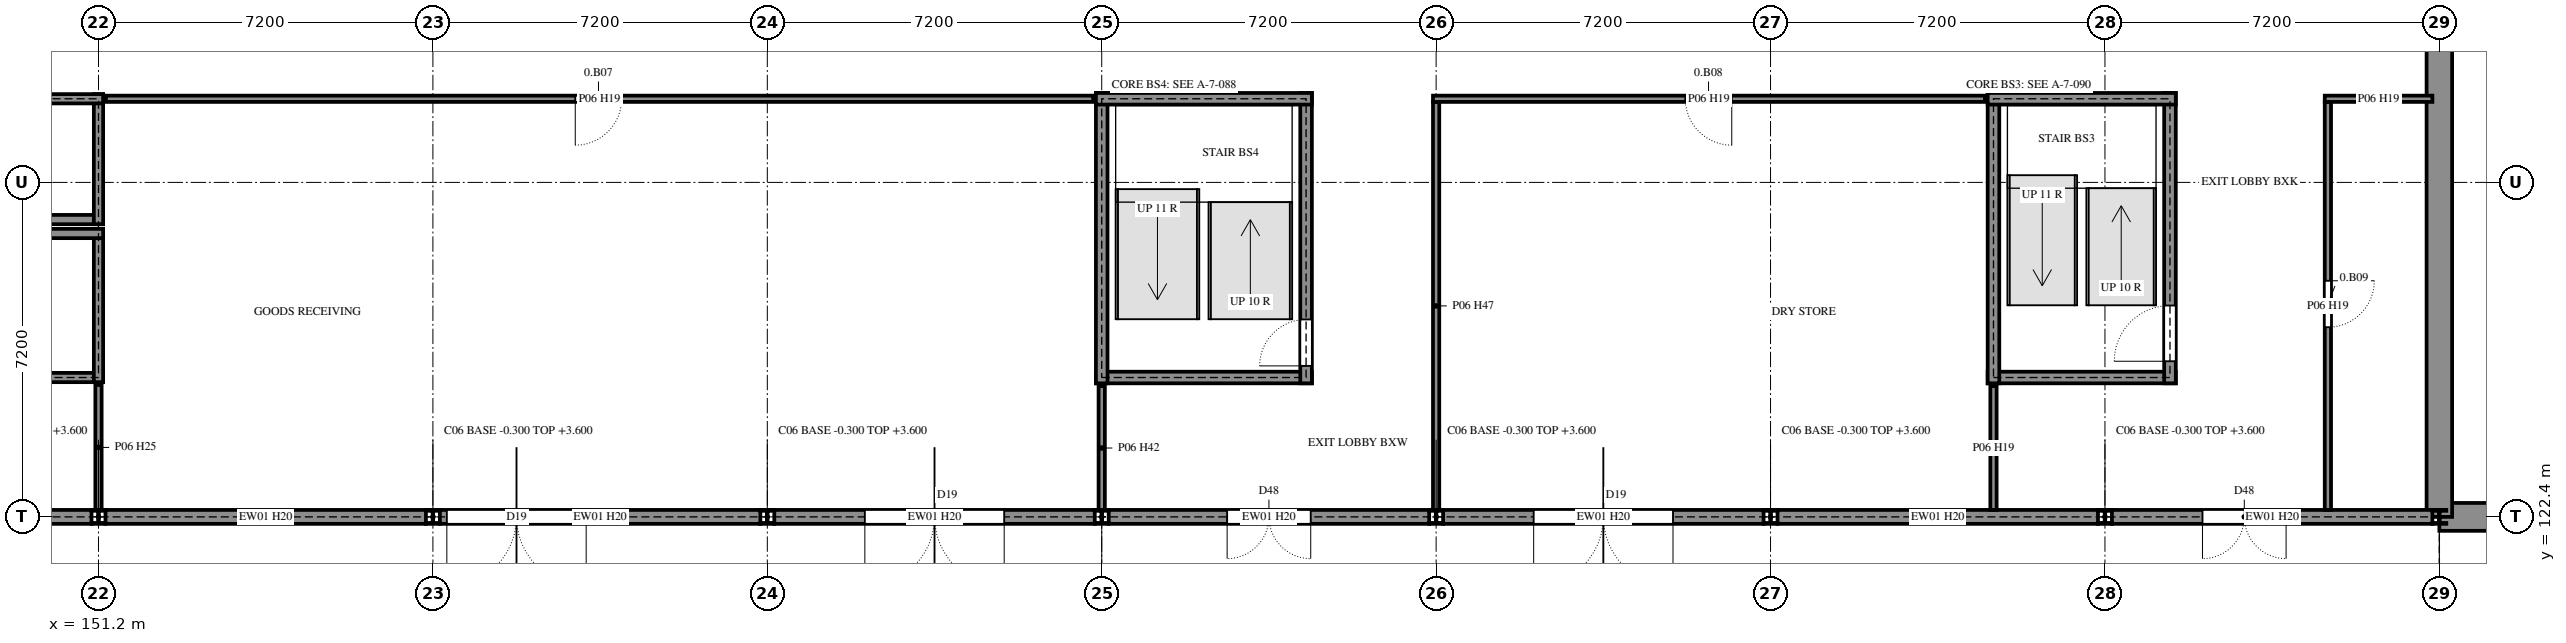
"""IFC4 building model, lengths in metres.
Left out: names, types, materials, properties, quantities, classifications, styles, units other than length and angle.
Written with IfcOpenShell. Run it as: python <this file> out.ifc"""

import sys

from ifc_helpers import new_model, si_unit, direction, frame, frame_2d, origin, origin_2d, place, context, subcontext, project, spatial, rectangle, i_section, extrude, element, fill, save


model = new_model("IFC4")
c1 = context("Model", 3, precision=1e-05, world=origin(), true_north=direction((0.0, 1.0)))
c2 = subcontext(c1, "Body", "Model", "MODEL_VIEW")
j1 = project(units=[si_unit("LENGTHUNIT", "METRE"), si_unit("PLANEANGLEUNIT", "RADIAN")], contexts=[c1])
p1 = place(None, origin())
s1 = spatial("IfcSite", under=j1, at=p1, CompositionType="ELEMENT")
p2 = place(p1, origin())
s2 = spatial("IfcBuilding", under=s1, at=p2, CompositionType="ELEMENT")
p3 = place(p2, origin())
s3 = spatial("IfcBuildingStorey", under=s2, at=p3, CompositionType="ELEMENT", Elevation=0.0)
for number, where, z_axis, x_axis in (
    (1, (151.2, 122.4, -0.3), (0.0, 0.0, 1.0), (1.0, 0.0, 0.0)),
    (2, (158.4, 122.4, -0.3), (0.0, 0.0, 1.0), (1.0, 0.0, 0.0)),
    (3, (165.6, 122.4, -0.3), (0.0, 0.0, 1.0), (1.0, 0.0, 0.0)),
    (4, (172.8, 122.4, -0.3), (0.0, 0.0, 1.0), (1.0, 0.0, 0.0)),
    (5, (180.0, 122.4, -0.3), (0.0, 0.0, 1.0), (1.0, 0.0, 0.0)),
    (6, (187.2, 122.4, -0.3), (0.0, 0.0, 1.0), (1.0, 0.0, 0.0)),
    (7, (194.4, 122.4, -0.3), (0.0, 0.0, 1.0), (1.0, 0.0, 0.0)),
    (8, (201.6, 122.4, -0.3), (0.0, 0.0, 1.0), (1.0, 0.0, 0.0)),
):
    element("IfcColumn", number, at=place(p3, frame(where, z_axis=z_axis, x_axis=x_axis)), inside=s3, PredefinedType="COLUMN", context=c2, shape_type="SweptSolid", body=[
        extrude(i_section(OverallWidth=0.3, OverallDepth=0.3, WebThickness=0.011, FlangeThickness=0.019, FilletRadius=0.027, at=origin_2d()), origin(), (0.0, 0.0, 1.0), 3.9),
    ])
p4 = place(p3, frame((140.725, 125.4, 0.0), z_axis=(0.0, 0.0, 1.0), x_axis=(1.0, 0.0, 0.0)))
e9 = element("IfcWall", 9, at=p4, inside=s3, PredefinedType="SHEAR", context=c2, shape_type="SweptSolid", body=[
    extrude(rectangle(XDim=10.575, YDim=0.2, at=frame_2d((5.288, 0.0))), origin(), (0.0, 0.0, 1.0), 3.6),
])
p5 = place(p4, frame((4.85, 0.0, 0.0)))
e10 = element("IfcOpeningElement", 10, at=p5, cuts=e9, PredefinedType="OPENING", context=c2, shape_type="SweptSolid", body=[
    extrude(rectangle(XDim=0.85, YDim=2.1, at=frame_2d((0.425, 1.05))), frame((0.0, 0.11, 0.0), z_axis=(0.0, -1.0, 0.0), x_axis=(1.0, 0.0, 0.0)), (0.0, 0.0, 1.0), 0.22),
])
p6 = place(p3, frame((151.2, 125.3, 0.0), z_axis=(0.0, 0.0, 1.0), x_axis=(0.0, 1.0, 0.0)))
e11 = element("IfcWall", 11, at=p6, inside=s3, PredefinedType="SHEAR", context=c2, shape_type="SweptSolid", body=[
    extrude(rectangle(XDim=3.3, YDim=0.2, at=frame_2d((1.65, 0.0))), origin(), (0.0, 0.0, 1.0), 3.6),
])
p7 = place(p3, frame((172.675, 125.4, 0.0), z_axis=(0.0, 0.0, 1.0), x_axis=(1.0, 0.0, 0.0)))
e12 = element("IfcWall", 12, at=p7, inside=s3, PredefinedType="SHEAR", context=c2, shape_type="SweptSolid", body=[
    extrude(rectangle(XDim=4.65, YDim=0.25, at=frame_2d((2.325, 0.0))), origin(), (0.0, 0.0, 1.0), 3.6),
])
p8 = place(p3, frame((177.2, 125.275, 0.0), z_axis=(0.0, 0.0, 1.0), x_axis=(0.0, 1.0, 0.0)))
e13 = element("IfcWall", 13, at=p8, inside=s3, PredefinedType="SHEAR", context=c2, shape_type="SweptSolid", body=[
    extrude(rectangle(XDim=6.25, YDim=0.25, at=frame_2d((3.125, 0.0))), origin(), (0.0, 0.0, 1.0), 3.6),
])
p9 = place(p8, frame((0.375, 0.0, 0.0)))
e14 = element("IfcOpeningElement", 14, at=p9, cuts=e13, PredefinedType="OPENING", context=c2, shape_type="SweptSolid", body=[
    extrude(rectangle(XDim=1.0, YDim=2.4, at=frame_2d((0.5, 1.2))), frame((0.0, 0.135, 0.0), z_axis=(0.0, -1.0, 0.0), x_axis=(1.0, 0.0, 0.0)), (0.0, 0.0, 1.0), 0.27),
])
p10 = place(p3, frame((191.875, 125.4, 0.0), z_axis=(0.0, 0.0, 1.0), x_axis=(1.0, 0.0, 0.0)))
e15 = element("IfcWall", 15, at=p10, inside=s3, PredefinedType="SHEAR", context=c2, shape_type="SweptSolid", body=[
    extrude(rectangle(XDim=4.05, YDim=0.25, at=frame_2d((2.025, 0.0))), origin(), (0.0, 0.0, 1.0), 3.6),
])
p11 = place(p3, frame((195.8, 125.275, 0.0), z_axis=(0.0, 0.0, 1.0), x_axis=(0.0, 1.0, 0.0)))
e16 = element("IfcWall", 16, at=p11, inside=s3, PredefinedType="SHEAR", context=c2, shape_type="SweptSolid", body=[
    extrude(rectangle(XDim=6.25, YDim=0.25, at=frame_2d((3.125, 0.0))), origin(), (0.0, 0.0, 1.0), 3.6),
])
p12 = place(p11, frame((0.475, 0.0, 0.0)))
e17 = element("IfcOpeningElement", 17, at=p12, cuts=e16, PredefinedType="OPENING", context=c2, shape_type="SweptSolid", body=[
    extrude(rectangle(XDim=1.2, YDim=2.4, at=frame_2d((0.6, 1.2))), frame((0.0, 0.135, 0.0), z_axis=(0.0, -1.0, 0.0), x_axis=(1.0, 0.0, 0.0)), (0.0, 0.0, 1.0), 0.27),
])
for number, where, z_axis, x_axis in (
    (18, (147.8, 128.5, 0.0), (0.0, 0.0, 1.0), (1.0, 0.0, 0.0)),
    (19, (147.8, 128.8, 0.0), (0.0, 0.0, 1.0), (1.0, 0.0, 0.0)),
):
    element("IfcWall", number, at=place(p3, frame(where, z_axis=z_axis, x_axis=x_axis)), inside=s3, PredefinedType="SHEAR", context=c2, shape_type="SweptSolid", body=[
        extrude(rectangle(XDim=3.5, YDim=0.2, at=frame_2d((1.75, 0.0))), origin(), (0.0, 0.0, 1.0), 3.6),
    ])
p13 = place(p3, frame((151.2, 128.7, 0.0), z_axis=(0.0, 0.0, 1.0), x_axis=(0.0, 1.0, 0.0)))
e20 = element("IfcWall", 20, at=p13, inside=s3, PredefinedType="SHEAR", context=c2, shape_type="SweptSolid", body=[
    extrude(rectangle(XDim=2.8, YDim=0.2, at=frame_2d((1.4, 0.0))), origin(), (0.0, 0.0, 1.0), 3.6),
])
p14 = place(p3, frame((151.3, 131.4, 0.0), z_axis=(0.0, 0.0, 1.0), x_axis=(-1.0, 0.0, 0.0)))
e21 = element("IfcWall", 21, at=p14, inside=s3, PredefinedType="SHEAR", context=c2, shape_type="SweptSolid", body=[
    extrude(rectangle(XDim=3.5, YDim=0.2, at=frame_2d((1.75, 0.0))), origin(), (0.0, 0.0, 1.0), 3.6),
])
p15 = place(p14, frame((1.35, 0.0, 0.0)))
e22 = element("IfcOpeningElement", 22, at=p15, cuts=e21, PredefinedType="OPENING", context=c2, shape_type="SweptSolid", body=[
    extrude(rectangle(XDim=0.85, YDim=2.1, at=frame_2d((0.425, 1.05))), frame((0.0, 0.11, 0.0), z_axis=(0.0, -1.0, 0.0), x_axis=(1.0, 0.0, 0.0)), (0.0, 0.0, 1.0), 0.22),
])
p16 = place(p3, frame((172.8, 131.525, 0.0), z_axis=(0.0, 0.0, 1.0), x_axis=(0.0, -1.0, 0.0)))
e23 = element("IfcWall", 23, at=p16, inside=s3, PredefinedType="SHEAR", context=c2, shape_type="SweptSolid", body=[
    extrude(rectangle(XDim=6.25, YDim=0.25, at=frame_2d((3.125, 0.0))), origin(), (0.0, 0.0, 1.0), 3.6),
])
p17 = place(p3, frame((177.325, 131.4, 0.0), z_axis=(0.0, 0.0, 1.0), x_axis=(-1.0, 0.0, 0.0)))
e24 = element("IfcWall", 24, at=p17, inside=s3, PredefinedType="SHEAR", context=c2, shape_type="SweptSolid", body=[
    extrude(rectangle(XDim=4.65, YDim=0.25, at=frame_2d((2.325, 0.0))), origin(), (0.0, 0.0, 1.0), 3.6),
])
p18 = place(p3, frame((192.0, 131.525, 0.0), z_axis=(0.0, 0.0, 1.0), x_axis=(0.0, -1.0, 0.0)))
e25 = element("IfcWall", 25, at=p18, inside=s3, PredefinedType="SHEAR", context=c2, shape_type="SweptSolid", body=[
    extrude(rectangle(XDim=6.25, YDim=0.25, at=frame_2d((3.125, 0.0))), origin(), (0.0, 0.0, 1.0), 3.6),
])
p19 = place(p3, frame((195.925, 131.4, 0.0), z_axis=(0.0, 0.0, 1.0), x_axis=(-1.0, 0.0, 0.0)))
e26 = element("IfcWall", 26, at=p19, inside=s3, PredefinedType="SHEAR", context=c2, shape_type="SweptSolid", body=[
    extrude(rectangle(XDim=4.05, YDim=0.25, at=frame_2d((2.025, 0.0))), origin(), (0.0, 0.0, 1.0), 3.6),
])
p20 = place(p3, frame((201.6, 122.4, 0.0), z_axis=(0.0, 0.0, 1.0), x_axis=(1.0, 0.0, 0.0)))
e27 = element("IfcWall", 27, at=p20, inside=s3, PredefinedType="SOLIDWALL", context=c2, shape_type="SweptSolid", body=[
    extrude(rectangle(XDim=7.07, YDim=0.6, at=frame_2d((3.535, 0.0))), origin(), (0.0, 0.0, 1.0), 3.6),
])
p21 = place(p3, frame((201.6, 122.4, 0.0), z_axis=(0.0, 0.0, 1.0), x_axis=(0.0, 1.0, 0.0)))
e28 = element("IfcWall", 28, at=p21, inside=s3, PredefinedType="SOLIDWALL", context=c2, shape_type="SweptSolid", body=[
    extrude(rectangle(XDim=28.8, YDim=0.55, at=frame_2d((14.4, 0.0))), origin(), (0.0, 0.0, 1.0), 3.6),
])
p22 = place(p3, frame((151.35, 122.4, 0.0), z_axis=(0.0, 0.0, 1.0), x_axis=(1.0, 0.0, 0.0)))
e29 = element("IfcWall", 29, at=p22, inside=s3, PredefinedType="SOLIDWALL", context=c2, shape_type="SweptSolid", body=[
    extrude(rectangle(XDim=6.9, YDim=0.3, at=frame_2d((3.45, 0.0))), origin(), (0.0, 0.0, 1.0), 3.1),
])
p23 = place(p3, frame((158.55, 122.4, 0.0), z_axis=(0.0, 0.0, 1.0), x_axis=(1.0, 0.0, 0.0)))
e30 = element("IfcWall", 30, at=p23, inside=s3, PredefinedType="SOLIDWALL", context=c2, shape_type="SweptSolid", body=[
    extrude(rectangle(XDim=6.9, YDim=0.3, at=frame_2d((3.45, 0.0))), origin(), (0.0, 0.0, 1.0), 3.1),
])
p24 = place(p23, frame((0.15, 0.0, 0.015)))
e31 = element("IfcOpeningElement", 31, at=p24, cuts=e30, PredefinedType="OPENING", context=c2, shape_type="SweptSolid", body=[
    extrude(rectangle(XDim=3.0, YDim=2.7, at=frame_2d((1.5, 1.35))), frame((0.0, 0.16, 0.0), z_axis=(0.0, -1.0, 0.0), x_axis=(1.0, 0.0, 0.0)), (0.0, 0.0, 1.0), 0.32),
])
p25 = place(p3, frame((165.75, 122.4, 0.0), z_axis=(0.0, 0.0, 1.0), x_axis=(1.0, 0.0, 0.0)))
e32 = element("IfcWall", 32, at=p25, inside=s3, PredefinedType="SOLIDWALL", context=c2, shape_type="SweptSolid", body=[
    extrude(rectangle(XDim=6.9, YDim=0.3, at=frame_2d((3.45, 0.0))), origin(), (0.0, 0.0, 1.0), 3.1),
])
p26 = place(p25, frame((1.95, 0.0, 0.015)))
e33 = element("IfcOpeningElement", 33, at=p26, cuts=e32, PredefinedType="OPENING", context=c2, shape_type="SweptSolid", body=[
    extrude(rectangle(XDim=3.0, YDim=2.7, at=frame_2d((1.5, 1.35))), frame((0.0, 0.16, 0.0), z_axis=(0.0, -1.0, 0.0), x_axis=(1.0, 0.0, 0.0)), (0.0, 0.0, 1.0), 0.32),
])
p27 = place(p3, frame((172.95, 122.4, 0.0), z_axis=(0.0, 0.0, 1.0), x_axis=(1.0, 0.0, 0.0)))
e34 = element("IfcWall", 34, at=p27, inside=s3, PredefinedType="SOLIDWALL", context=c2, shape_type="SweptSolid", body=[
    extrude(rectangle(XDim=6.9, YDim=0.3, at=frame_2d((3.45, 0.0))), origin(), (0.0, 0.0, 1.0), 3.1),
])
p28 = place(p27, frame((2.55, 0.0, 0.015)))
e35 = element("IfcOpeningElement", 35, at=p28, cuts=e34, PredefinedType="OPENING", context=c2, shape_type="SweptSolid", body=[
    extrude(rectangle(XDim=1.8, YDim=2.1, at=frame_2d((0.9, 1.05))), frame((0.0, 0.16, 0.0), z_axis=(0.0, -1.0, 0.0), x_axis=(1.0, 0.0, 0.0)), (0.0, 0.0, 1.0), 0.32),
])
p29 = place(p3, frame((180.15, 122.4, 0.0), z_axis=(0.0, 0.0, 1.0), x_axis=(1.0, 0.0, 0.0)))
e36 = element("IfcWall", 36, at=p29, inside=s3, PredefinedType="SOLIDWALL", context=c2, shape_type="SweptSolid", body=[
    extrude(rectangle(XDim=6.9, YDim=0.3, at=frame_2d((3.45, 0.0))), origin(), (0.0, 0.0, 1.0), 3.1),
])
p30 = place(p29, frame((1.95, 0.0, 0.015)))
e37 = element("IfcOpeningElement", 37, at=p30, cuts=e36, PredefinedType="OPENING", context=c2, shape_type="SweptSolid", body=[
    extrude(rectangle(XDim=3.0, YDim=2.7, at=frame_2d((1.5, 1.35))), frame((0.0, 0.16, 0.0), z_axis=(0.0, -1.0, 0.0), x_axis=(1.0, 0.0, 0.0)), (0.0, 0.0, 1.0), 0.32),
])
p31 = place(p3, frame((187.35, 122.4, 0.0), z_axis=(0.0, 0.0, 1.0), x_axis=(1.0, 0.0, 0.0)))
e38 = element("IfcWall", 38, at=p31, inside=s3, PredefinedType="SOLIDWALL", context=c2, shape_type="SweptSolid", body=[
    extrude(rectangle(XDim=6.9, YDim=0.3, at=frame_2d((3.45, 0.0))), origin(), (0.0, 0.0, 1.0), 3.1),
])
p32 = place(p3, frame((194.55, 122.4, 0.0), z_axis=(0.0, 0.0, 1.0), x_axis=(1.0, 0.0, 0.0)))
e39 = element("IfcWall", 39, at=p32, inside=s3, PredefinedType="SOLIDWALL", context=c2, shape_type="SweptSolid", body=[
    extrude(rectangle(XDim=6.9, YDim=0.3, at=frame_2d((3.45, 0.0))), origin(), (0.0, 0.0, 1.0), 3.1),
])
p33 = place(p32, frame((1.95, 0.0, 0.015)))
e40 = element("IfcOpeningElement", 40, at=p33, cuts=e39, PredefinedType="OPENING", context=c2, shape_type="SweptSolid", body=[
    extrude(rectangle(XDim=1.8, YDim=2.1, at=frame_2d((0.9, 1.05))), frame((0.0, 0.16, 0.0), z_axis=(0.0, -1.0, 0.0), x_axis=(1.0, 0.0, 0.0)), (0.0, 0.0, 1.0), 0.32),
])
p34 = place(p3, frame((144.15, 122.4, 0.0), z_axis=(0.0, 0.0, 1.0), x_axis=(1.0, 0.0, 0.0)))
e41 = element("IfcWall", 41, at=p34, inside=s3, PredefinedType="SOLIDWALL", context=c2, shape_type="SweptSolid", body=[
    extrude(rectangle(XDim=6.9, YDim=0.3, at=frame_2d((3.45, 0.0))), origin(), (0.0, 0.0, 1.0), 3.12),
])
p35 = place(p3, frame((151.2, 122.55, 0.0), z_axis=(0.0, 0.0, 1.0), x_axis=(0.0, 1.0, 0.0)))
e42 = element("IfcWall", 42, at=p35, inside=s3, PredefinedType="PARTITIONING", context=c2, shape_type="SweptSolid", body=[
    extrude(rectangle(XDim=2.69, YDim=0.135, at=frame_2d((1.345, 0.0))), origin(), (0.0, 0.0, 1.0), 3.219),
])
p36 = place(p3, frame((192.0, 122.55, 0.0), z_axis=(0.0, 0.0, 1.0), x_axis=(0.0, 1.0, 0.0)))
e43 = element("IfcWall", 43, at=p36, inside=s3, PredefinedType="PARTITIONING", context=c2, shape_type="SweptSolid", body=[
    extrude(rectangle(XDim=2.665, YDim=0.135, at=frame_2d((1.333, 0.0))), origin(), (0.0, 0.0, 1.0), 3.4),
])
p37 = place(p3, frame((199.2, 131.333, 0.0), z_axis=(0.0, 0.0, 1.0), x_axis=(0.0, -1.0, 0.0)))
e44 = element("IfcWall", 44, at=p37, inside=s3, PredefinedType="PARTITIONING", context=c2, shape_type="SweptSolid", body=[
    extrude(rectangle(XDim=8.782, YDim=0.135, at=frame_2d((4.391, 0.0))), origin(), (0.0, 0.0, 1.0), 3.4),
])
p38 = place(p37, frame((3.85, 0.0, 0.0)))
e45 = element("IfcOpeningElement", 45, at=p38, cuts=e44, PredefinedType="OPENING", context=c2, shape_type="SweptSolid", body=[
    extrude(rectangle(XDim=1.0, YDim=2.4, at=frame_2d((0.5, 1.2))), frame((0.0, 0.077, 0.0), z_axis=(0.0, -1.0, 0.0), x_axis=(1.0, 0.0, 0.0)), (0.0, 0.0, 1.0), 0.155),
])
p39 = place(p3, frame((172.8, 122.55, 0.0), z_axis=(0.0, 0.0, 1.0), x_axis=(0.0, 1.0, 0.0)))
e46 = element("IfcWall", 46, at=p39, inside=s3, PredefinedType="PARTITIONING", context=c2, shape_type="SweptSolid", body=[
    extrude(rectangle(XDim=2.665, YDim=0.135, at=frame_2d((1.333, 0.0))), origin(), (0.0, 0.0, 1.0), 3.199),
])
p40 = place(p3, frame((180.0, 131.333, 0.0), z_axis=(0.0, 0.0, 1.0), x_axis=(0.0, -1.0, 0.0)))
e47 = element("IfcWall", 47, at=p40, inside=s3, PredefinedType="PARTITIONING", context=c2, shape_type="SweptSolid", body=[
    extrude(rectangle(XDim=8.782, YDim=0.135, at=frame_2d((4.391, 0.0))), origin(), (0.0, 0.0, 1.0), 2.8),
])
p41 = place(p3, frame((172.615, 131.4, 0.0), z_axis=(0.0, 0.0, 1.0), x_axis=(-1.0, 0.0, 0.0)))
e48 = element("IfcWall", 48, at=p41, inside=s3, PredefinedType="PARTITIONING", context=c2, shape_type="SweptSolid", body=[
    extrude(rectangle(XDim=21.255, YDim=0.135, at=frame_2d((10.627, 0.0))), origin(), (0.0, 0.0, 1.0), 3.4),
])
p42 = place(p41, frame((10.15, 0.0, 0.0)))
e49 = element("IfcOpeningElement", 49, at=p42, cuts=e48, PredefinedType="OPENING", context=c2, shape_type="SweptSolid", body=[
    extrude(rectangle(XDim=1.0, YDim=2.4, at=frame_2d((0.5, 1.2))), frame((0.0, 0.077, 0.0), z_axis=(0.0, -1.0, 0.0), x_axis=(1.0, 0.0, 0.0)), (0.0, 0.0, 1.0), 0.155),
])
p43 = place(p3, frame((191.815, 131.4, 0.0), z_axis=(0.0, 0.0, 1.0), x_axis=(-1.0, 0.0, 0.0)))
e50 = element("IfcWall", 50, at=p43, inside=s3, PredefinedType="PARTITIONING", context=c2, shape_type="SweptSolid", body=[
    extrude(rectangle(XDim=11.882, YDim=0.135, at=frame_2d((5.941, 0.0))), origin(), (0.0, 0.0, 1.0), 3.4),
])
p44 = place(p43, frame((5.45, 0.0, 0.0)))
e51 = element("IfcOpeningElement", 51, at=p44, cuts=e50, PredefinedType="OPENING", context=c2, shape_type="SweptSolid", body=[
    extrude(rectangle(XDim=1.0, YDim=2.4, at=frame_2d((0.5, 1.2))), frame((0.0, 0.077, 0.0), z_axis=(0.0, -1.0, 0.0), x_axis=(1.0, 0.0, 0.0)), (0.0, 0.0, 1.0), 0.155),
])
p45 = place(p3, frame((201.45, 131.4, 0.0), z_axis=(0.0, 0.0, 1.0), x_axis=(-1.0, 0.0, 0.0)))
e52 = element("IfcWall", 52, at=p45, inside=s3, PredefinedType="PARTITIONING", context=c2, shape_type="SweptSolid", body=[
    extrude(rectangle(XDim=2.317, YDim=0.135, at=frame_2d((1.159, 0.0))), origin(), (0.0, 0.0, 1.0), 3.4),
])
p46 = place(p24, frame((3.0, 0.0, 0.0), z_axis=(0.0, 0.0, 1.0), x_axis=(-1.0, 0.0, 0.0)))
e53 = element("IfcDoor", 53, at=p46, inside=s3, OperationType="DOUBLE_DOOR_SINGLE_SWING", PredefinedType="DOOR", context=c2, shape_type="SweptSolid", body=[
    extrude(rectangle(XDim=3.0, YDim=2.7, at=frame_2d((1.5, 1.35))), frame((0.0, 0.025, 0.0), z_axis=(0.0, -1.0, 0.0), x_axis=(1.0, 0.0, 0.0)), (0.0, 0.0, 1.0), 0.05),
])
fill(e31, e53)
p47 = place(p26, frame((3.0, 0.0, 0.0), z_axis=(0.0, 0.0, 1.0), x_axis=(-1.0, 0.0, 0.0)))
e54 = element("IfcDoor", 54, at=p47, inside=s3, OperationType="DOUBLE_DOOR_SINGLE_SWING", PredefinedType="DOOR", context=c2, shape_type="SweptSolid", body=[
    extrude(rectangle(XDim=3.0, YDim=2.7, at=frame_2d((1.5, 1.35))), frame((0.0, 0.025, 0.0), z_axis=(0.0, -1.0, 0.0), x_axis=(1.0, 0.0, 0.0)), (0.0, 0.0, 1.0), 0.05),
])
fill(e33, e54)
p48 = place(p28, frame((1.8, 0.0, 0.0), z_axis=(0.0, 0.0, 1.0), x_axis=(-1.0, 0.0, 0.0)))
e55 = element("IfcDoor", 55, at=p48, inside=s3, OperationType="DOUBLE_DOOR_SINGLE_SWING", PredefinedType="DOOR", context=c2, shape_type="SweptSolid", body=[
    extrude(rectangle(XDim=1.8, YDim=2.1, at=frame_2d((0.9, 1.05))), frame((0.0, 0.025, 0.0), z_axis=(0.0, -1.0, 0.0), x_axis=(1.0, 0.0, 0.0)), (0.0, 0.0, 1.0), 0.05),
])
fill(e35, e55)
p49 = place(p30, frame((3.0, 0.0, 0.0), z_axis=(0.0, 0.0, 1.0), x_axis=(-1.0, 0.0, 0.0)))
e56 = element("IfcDoor", 56, at=p49, inside=s3, OperationType="DOUBLE_DOOR_SINGLE_SWING", PredefinedType="DOOR", context=c2, shape_type="SweptSolid", body=[
    extrude(rectangle(XDim=3.0, YDim=2.7, at=frame_2d((1.5, 1.35))), frame((0.0, 0.025, 0.0), z_axis=(0.0, -1.0, 0.0), x_axis=(1.0, 0.0, 0.0)), (0.0, 0.0, 1.0), 0.05),
])
fill(e37, e56)
p50 = place(p33, frame((1.8, 0.0, 0.0), z_axis=(0.0, 0.0, 1.0), x_axis=(-1.0, 0.0, 0.0)))
e57 = element("IfcDoor", 57, at=p50, inside=s3, OperationType="DOUBLE_DOOR_SINGLE_SWING", PredefinedType="DOOR", context=c2, shape_type="SweptSolid", body=[
    extrude(rectangle(XDim=1.8, YDim=2.1, at=frame_2d((0.9, 1.05))), frame((0.0, 0.025, 0.0), z_axis=(0.0, -1.0, 0.0), x_axis=(1.0, 0.0, 0.0)), (0.0, 0.0, 1.0), 0.05),
])
fill(e40, e57)
p51 = place(p12, origin())
e58 = element("IfcDoor", 58, at=p51, inside=s3, OperationType="SINGLE_SWING_RIGHT", PredefinedType="DOOR", context=c2, shape_type="SweptSolid", body=[
    extrude(rectangle(XDim=1.2, YDim=2.4, at=frame_2d((0.6, 1.2))), frame((0.0, 0.025, 0.0), z_axis=(0.0, -1.0, 0.0), x_axis=(1.0, 0.0, 0.0)), (0.0, 0.0, 1.0), 0.05),
])
fill(e17, e58)
p52 = place(p9, origin())
e59 = element("IfcDoor", 59, at=p52, inside=s3, OperationType="SINGLE_SWING_RIGHT", PredefinedType="DOOR", context=c2, shape_type="SweptSolid", body=[
    extrude(rectangle(XDim=1.0, YDim=2.4, at=frame_2d((0.5, 1.2))), frame((0.0, 0.025, 0.0), z_axis=(0.0, -1.0, 0.0), x_axis=(1.0, 0.0, 0.0)), (0.0, 0.0, 1.0), 0.05),
])
fill(e14, e59)
p53 = place(p42, origin())
e60 = element("IfcDoor", 60, at=p53, inside=s3, OperationType="SINGLE_SWING_LEFT", PredefinedType="DOOR", context=c2, shape_type="SweptSolid", body=[
    extrude(rectangle(XDim=1.0, YDim=2.4, at=frame_2d((0.5, 1.2))), frame((0.0, 0.025, 0.0), z_axis=(0.0, -1.0, 0.0), x_axis=(1.0, 0.0, 0.0)), (0.0, 0.0, 1.0), 0.05),
])
fill(e49, e60)
p54 = place(p44, origin())
e61 = element("IfcDoor", 61, at=p54, inside=s3, OperationType="SINGLE_SWING_RIGHT", PredefinedType="DOOR", context=c2, shape_type="SweptSolid", body=[
    extrude(rectangle(XDim=1.0, YDim=2.4, at=frame_2d((0.5, 1.2))), frame((0.0, 0.025, 0.0), z_axis=(0.0, -1.0, 0.0), x_axis=(1.0, 0.0, 0.0)), (0.0, 0.0, 1.0), 0.05),
])
fill(e51, e61)
p55 = place(p38, origin())
e62 = element("IfcDoor", 62, at=p55, inside=s3, OperationType="SINGLE_SWING_RIGHT", PredefinedType="DOOR", context=c2, shape_type="SweptSolid", body=[
    extrude(rectangle(XDim=1.0, YDim=2.4, at=frame_2d((0.5, 1.2))), frame((0.0, 0.025, 0.0), z_axis=(0.0, -1.0, 0.0), x_axis=(1.0, 0.0, 0.0)), (0.0, 0.0, 1.0), 0.05),
])
fill(e45, e62)
save(model, sys.argv[1])
